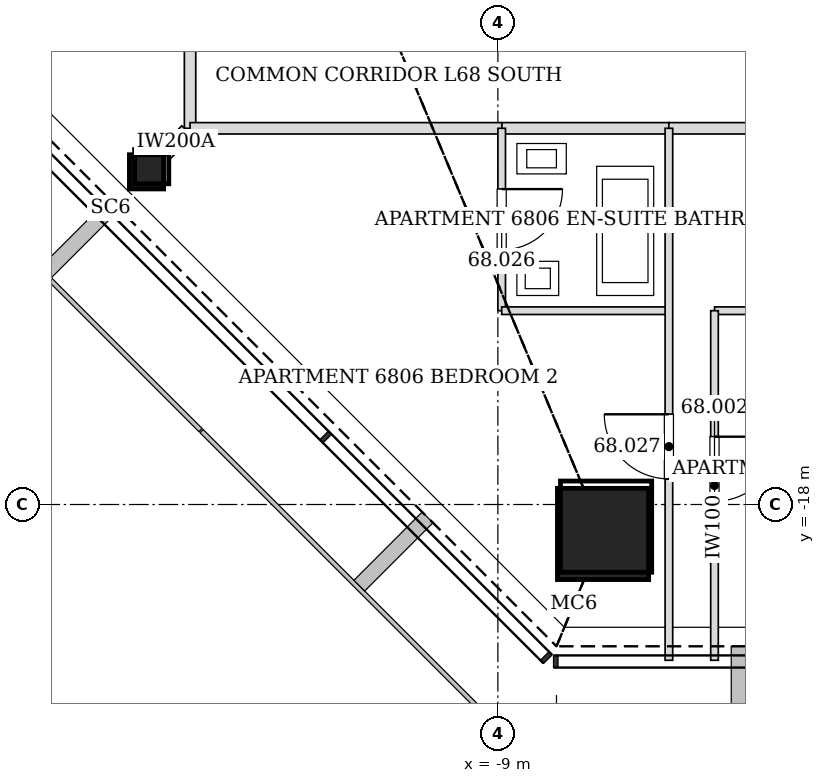
"""IFC4 building model, lengths in metres.
Left out: names, types, materials, properties, quantities, classifications, styles, units other than length and angle.
Written with IfcOpenShell. Run it as: python <this file> out.ifc"""

import sys

from ifc_helpers import new_model, si_unit, direction, frame, frame_2d, origin, origin_2d, place, context, subcontext, project, spatial, rectangle, hollow_rectangle, extrude, element, fill, save


model = new_model("IFC4")
c1 = context("Model", 3, precision=1e-05, world=origin(), true_north=direction((0.0, 1.0)))
c2 = subcontext(c1, "Body", "Model", "MODEL_VIEW")
j1 = project(units=[si_unit("LENGTHUNIT", "METRE"), si_unit("PLANEANGLEUNIT", "RADIAN")], contexts=[c1])
p1 = place(None, origin())
s1 = spatial("IfcSite", under=j1, at=p1, CompositionType="ELEMENT")
p2 = place(p1, origin())
s2 = spatial("IfcBuilding", under=s1, at=p2, CompositionType="ELEMENT")
p3 = place(p2, frame((0.0, 0.0, 281.0)))
s3 = spatial("IfcBuildingStorey", under=s2, at=p3, CompositionType="ELEMENT", Elevation=281.0)
p4 = place(p3, frame((-7.616, -18.387, 0.0), z_axis=(0.01169924247, 0.02827915051, 0.999531598986), x_axis=(-0.924045401938, 0.382282742426, 0.0)))
e1 = element("IfcColumn", 1, at=p4, inside=s3, PredefinedType="COLUMN", context=c2, shape_type="SweptSolid", body=[
    extrude(hollow_rectangle(XDim=1.2, YDim=1.2, WallThickness=0.055, at=origin_2d()), origin(), (0.0, 0.0, 1.0), 3.402),
])
p5 = place(p3, frame((-13.623, -13.623, 0.0), z_axis=(0.01995470925, 0.01995470925, 0.999601730269), x_axis=(-0.707106781187, 0.707106781187, 0.0)))
e2 = element("IfcColumn", 2, at=p5, inside=s3, PredefinedType="COLUMN", context=c2, shape_type="SweptSolid", body=[
    extrude(hollow_rectangle(XDim=0.45, YDim=0.45, WallThickness=0.02, at=origin_2d()), origin(), (0.0, 0.0, 1.0), 3.401),
])
p6 = place(p3, frame((-13.05, -9.899, 0.0), z_axis=(0.0, 0.0, 1.0), x_axis=(0.0, -1.0, 0.0)))
e3 = element("IfcWall", 3, at=p6, inside=s3, PredefinedType="PARTITIONING", context=c2, shape_type="SweptSolid", body=[
    extrude(rectangle(XDim=3.151, YDim=0.15, at=frame_2d((1.576, 0.0))), origin(), (0.0, 0.0, 1.0), 2.428),
])
p7 = place(p3, frame((-8.951, -13.05, 0.0), z_axis=(0.0, 0.0, 1.0), x_axis=(1.0, 0.0, 0.0)))
e4 = element("IfcWall", 4, at=p7, inside=s3, PredefinedType="PARTITIONING", context=c2, shape_type="SweptSolid", body=[
    extrude(rectangle(XDim=2.202, YDim=0.15, at=frame_2d((1.101, 0.0))), origin(), (0.0, 0.0, 1.0), 3.2),
])
p8 = place(p3, frame((-13.05, -13.05, 0.0), z_axis=(0.0, 0.0, 1.0), x_axis=(1.0, 0.0, 0.0)))
e5 = element("IfcWall", 5, at=p8, inside=s3, PredefinedType="PARTITIONING", context=c2, shape_type="SweptSolid", body=[
    extrude(rectangle(XDim=4.101, YDim=0.15, at=frame_2d((2.051, 0.0))), origin(), (0.0, 0.0, 1.0), 2.428),
])
p9 = place(p3, frame((-6.751, -13.05, 0.0), z_axis=(0.0, 0.0, 1.0), x_axis=(1.0, 0.0, 0.0)))
e6 = element("IfcWall", 6, at=p9, inside=s3, PredefinedType="PARTITIONING", context=c2, shape_type="SweptSolid", body=[
    extrude(rectangle(XDim=9.802, YDim=0.15, at=frame_2d((4.901, 0.0))), origin(), (0.0, 0.0, 1.0), 2.344),
])
p10 = place(p3, frame((-2.75, -15.45, 0.0), z_axis=(0.0, 0.0, 1.0), x_axis=(-1.0, 0.0, 0.0)))
e7 = element("IfcWall", 7, at=p10, inside=s3, PredefinedType="PARTITIONING", context=c2, shape_type="SweptSolid", body=[
    extrude(rectangle(XDim=3.4, YDim=0.1, at=frame_2d((1.7, 0.0))), origin(), (0.0, 0.0, 1.0), 3.2),
])
p11 = place(p3, frame((-6.15, -15.45, 0.0), z_axis=(0.0, 0.0, 1.0), x_axis=(0.0, -1.0, 0.0)))
e8 = element("IfcWall", 8, at=p11, inside=s3, PredefinedType="PARTITIONING", context=c2, shape_type="SweptSolid", body=[
    extrude(rectangle(XDim=4.6, YDim=0.1, at=frame_2d((2.3, 0.0))), origin(), (0.0, 0.0, 1.0), 2.591),
])
p12 = place(p11, frame((1.658, 0.0, 0.0)))
e9 = element("IfcOpeningElement", 9, at=p12, cuts=e8, PredefinedType="OPENING", context=c2, shape_type="SweptSolid", body=[
    extrude(rectangle(XDim=0.85, YDim=2.1, at=frame_2d((0.425, 1.05))), frame((0.0, 0.06, 0.0), z_axis=(0.0, -1.0, 0.0), x_axis=(1.0, 0.0, 0.0)), (0.0, 0.0, 1.0), 0.12),
])
p13 = place(p3, frame((-13.382, -13.382, 0.0), z_axis=(0.0, 0.0, 1.0), x_axis=(0.707106781187, 0.707106781187, 0.0)))
e10 = element("IfcWall", 10, at=p13, inside=s3, PredefinedType="PARTITIONING", context=c2, shape_type="SweptSolid", body=[
    extrude(rectangle(XDim=0.417, YDim=0.2, at=frame_2d((0.208, 0.0))), origin(), (0.0, 0.0, 1.0), 2.591),
])
p14 = place(p3, frame((-8.95, -13.05, 0.0), z_axis=(0.0, 0.0, 1.0), x_axis=(0.0, -1.0, 0.0)))
e11 = element("IfcWall", 11, at=p14, inside=s3, PredefinedType="PARTITIONING", context=c2, shape_type="SweptSolid", body=[
    extrude(rectangle(XDim=2.4, YDim=0.1, at=frame_2d((1.2, 0.0))), origin(), (0.0, 0.0, 1.0), 2.428),
])
p15 = place(p14, frame((0.8, 0.0, 0.0)))
e12 = element("IfcOpeningElement", 12, at=p15, cuts=e11, PredefinedType="OPENING", context=c2, shape_type="SweptSolid", body=[
    extrude(rectangle(XDim=0.8, YDim=2.1, at=frame_2d((0.4, 1.05))), frame((0.0, 0.06, 0.0), z_axis=(0.0, -1.0, 0.0), x_axis=(1.0, 0.0, 0.0)), (0.0, 0.0, 1.0), 0.12),
])
p16 = place(p3, frame((-8.95, -15.45, 0.0), z_axis=(0.0, 0.0, 1.0), x_axis=(1.0, 0.0, 0.0)))
e13 = element("IfcWall", 13, at=p16, inside=s3, PredefinedType="PARTITIONING", context=c2, shape_type="SweptSolid", body=[
    extrude(rectangle(XDim=2.2, YDim=0.1, at=frame_2d((1.1, 0.0))), origin(), (0.0, 0.0, 1.0), 2.428),
])
p17 = place(p3, frame((-6.75, -13.05, 0.0), z_axis=(0.0, 0.0, 1.0), x_axis=(0.0, -1.0, 0.0)))
e14 = element("IfcWall", 14, at=p17, inside=s3, PredefinedType="PARTITIONING", context=c2, shape_type="SweptSolid", body=[
    extrude(rectangle(XDim=7.0, YDim=0.1, at=frame_2d((3.5, 0.0))), origin(), (0.0, 0.0, 1.0), 2.591),
])
p18 = place(p17, frame((3.763, 0.0, 0.0)))
e15 = element("IfcOpeningElement", 15, at=p18, cuts=e14, PredefinedType="OPENING", context=c2, shape_type="SweptSolid", body=[
    extrude(rectangle(XDim=0.85, YDim=2.1, at=frame_2d((0.425, 1.05))), frame((0.0, 0.06, 0.0), z_axis=(0.0, -1.0, 0.0), x_axis=(1.0, 0.0, 0.0)), (0.0, 0.0, 1.0), 0.12),
])
p19 = place(p12, origin())
e16 = element("IfcDoor", 16, at=p19, inside=s3, OperationType="SINGLE_SWING_LEFT", PredefinedType="DOOR", context=c2, shape_type="SweptSolid", body=[
    extrude(rectangle(XDim=0.85, YDim=2.1, at=frame_2d((0.425, 1.05))), frame((0.0, 0.025, 0.0), z_axis=(0.0, -1.0, 0.0), x_axis=(1.0, 0.0, 0.0)), (0.0, 0.0, 1.0), 0.05),
])
fill(e9, e16)
p20 = place(p15, origin())
e17 = element("IfcDoor", 17, at=p20, inside=s3, OperationType="SINGLE_SWING_LEFT", PredefinedType="DOOR", context=c2, shape_type="SweptSolid", body=[
    extrude(rectangle(XDim=0.8, YDim=2.1, at=frame_2d((0.4, 1.05))), frame((0.0, 0.025, 0.0), z_axis=(0.0, -1.0, 0.0), x_axis=(1.0, 0.0, 0.0)), (0.0, 0.0, 1.0), 0.05),
])
fill(e12, e17)
p21 = place(p18, frame((0.85, 0.0, 0.0), z_axis=(0.0, 0.0, 1.0), x_axis=(-1.0, 0.0, 0.0)))
e18 = element("IfcDoor", 18, at=p21, inside=s3, OperationType="SINGLE_SWING_RIGHT", PredefinedType="DOOR", context=c2, shape_type="SweptSolid", body=[
    extrude(rectangle(XDim=0.85, YDim=2.1, at=frame_2d((0.425, 1.05))), frame((0.0, 0.025, 0.0), z_axis=(0.0, -1.0, 0.0), x_axis=(1.0, 0.0, 0.0)), (0.0, 0.0, 1.0), 0.05),
])
fill(e15, e18)
save(model, sys.argv[1])
